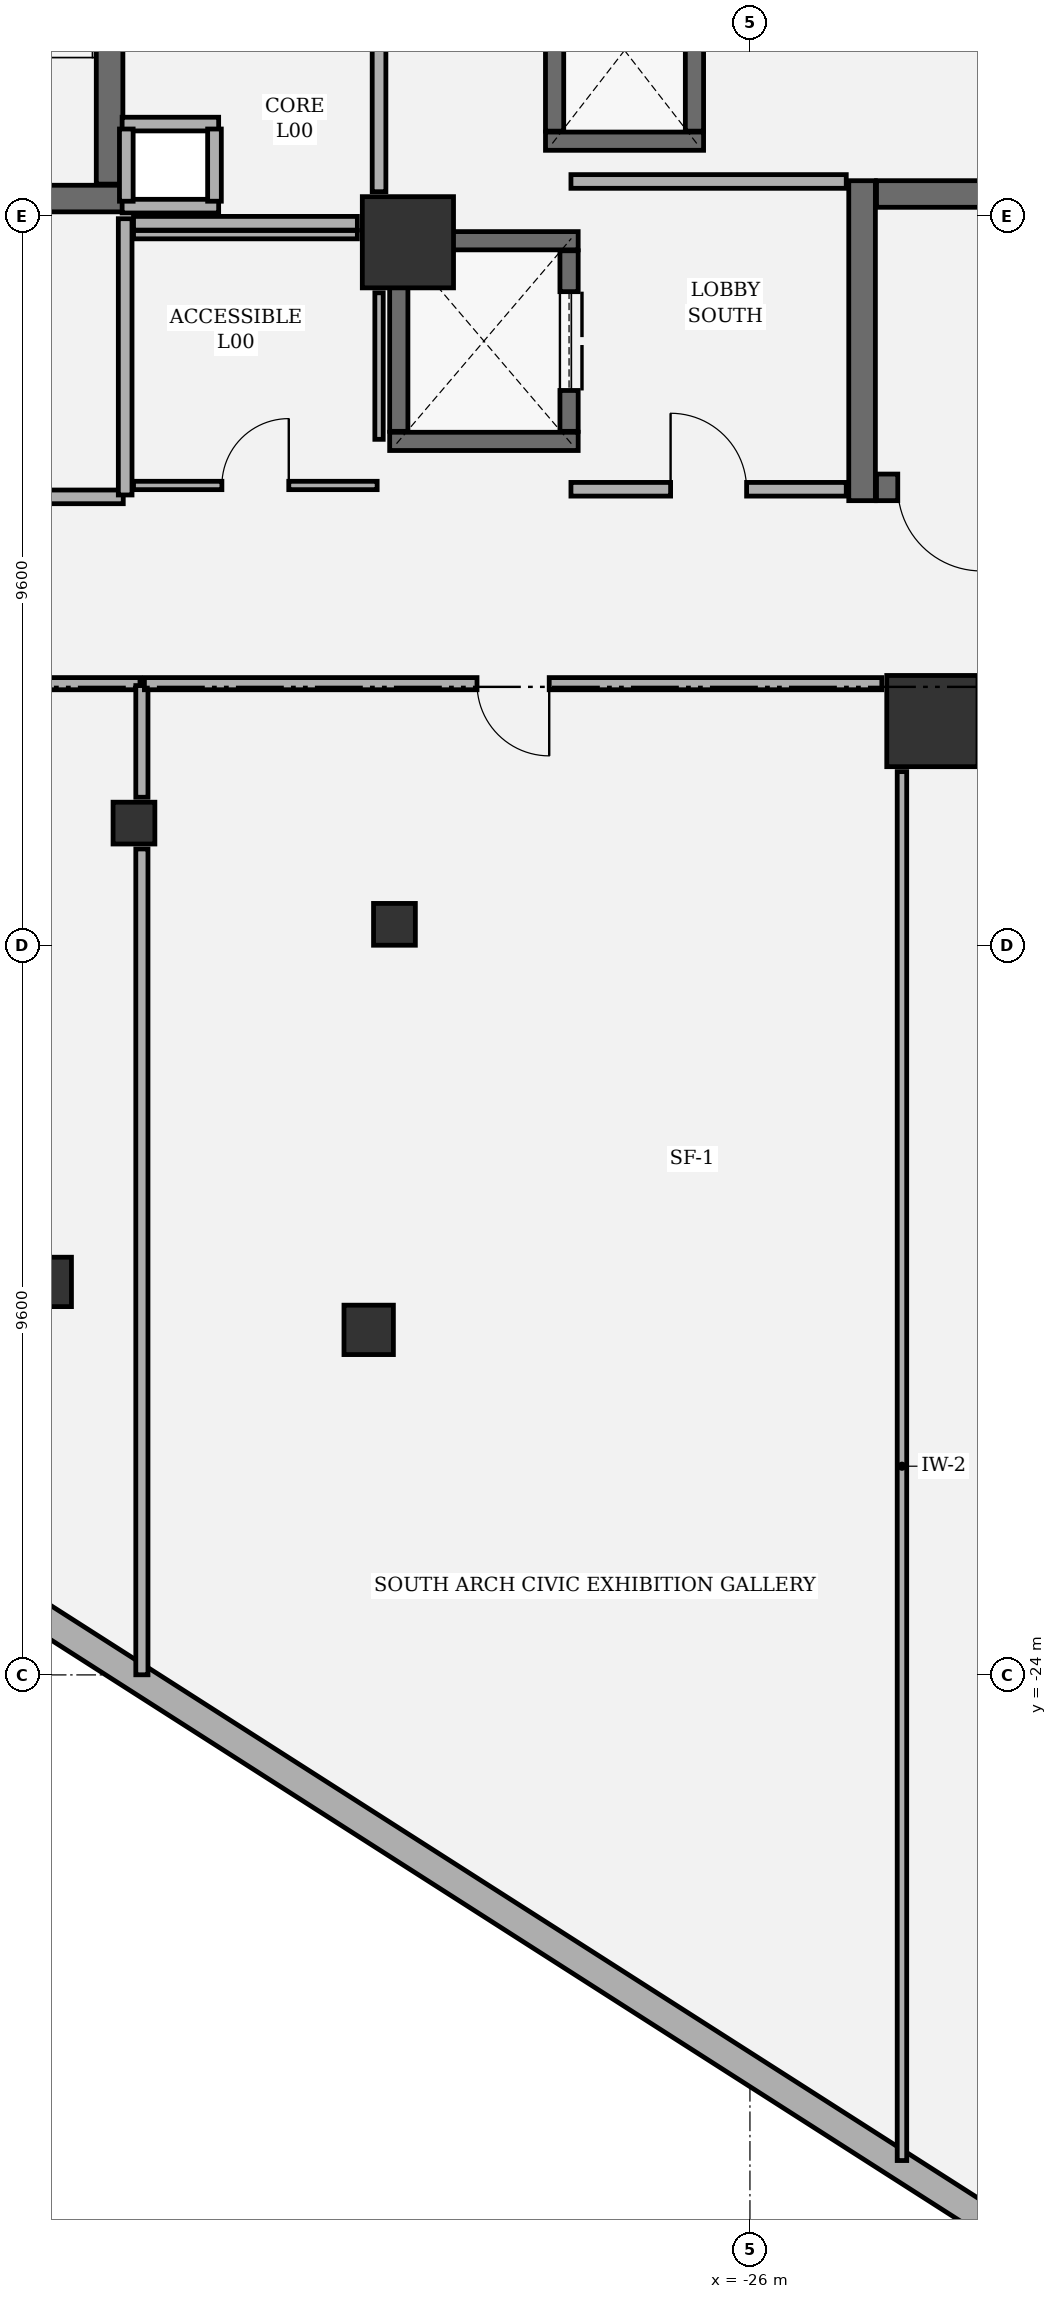
"""IFC4 building model, lengths in metres.
Left out: names, types, materials, properties, quantities, classifications, styles, units other than length and angle.
Written with IfcOpenShell. Run it as: python <this file> out.ifc"""

import sys

from ifc_helpers import new_model, si_unit, direction, frame, frame_2d, origin, origin_2d, place, context, subcontext, project, spatial, rectangle, extrude, element, fill, save


model = new_model("IFC4")
c1 = context("Model", 3, precision=1e-05, world=origin(), true_north=direction((0.0, 1.0)))
c2 = subcontext(c1, "Body", "Model", "MODEL_VIEW")
j1 = project(units=[si_unit("LENGTHUNIT", "METRE"), si_unit("PLANEANGLEUNIT", "RADIAN")], contexts=[c1])
p1 = place(None, origin())
s1 = spatial("IfcSite", under=j1, at=p1, CompositionType="ELEMENT")
p2 = place(p1, origin())
s2 = spatial("IfcBuilding", under=s1, at=p2, CompositionType="ELEMENT")
p3 = place(p2, origin())
s3 = spatial("IfcBuildingStorey", under=s2, at=p3, CompositionType="ELEMENT", Elevation=0.0)
for number, where, z_axis, x_axis in (
    (1, (-23.6, -11.45, 0.0), (0.0, 0.0, 1.0), (1.0, 0.0, 0.0)),
    (2, (-30.5, -5.15, 0.0), (0.0, 0.0, 1.0), (1.0, 0.0, 0.0)),
):
    element("IfcColumn", number, at=place(p3, frame(where, z_axis=z_axis, x_axis=x_axis)), inside=s3, PredefinedType="COLUMN", context=c2, shape_type="SweptSolid", body=[
        extrude(rectangle(XDim=1.2, YDim=1.2, at=origin_2d()), origin(), (0.0, 0.0, 1.0), 6.6),
    ])
for number, where, z_axis, x_axis in (
    (3, (-35.252, -18.829, 0.0), (0.0, 0.0, 1.0), (1.0, 0.0, 0.0)),
    (4, (-31.016, -19.46, 0.0), (0.0, 0.0, 1.0), (1.0, 0.0, 0.0)),
):
    element("IfcColumn", number, at=place(p3, frame(where, z_axis=z_axis, x_axis=x_axis)), inside=s3, PredefinedType="COLUMN", context=c2, shape_type="SweptSolid", body=[
        extrude(rectangle(XDim=0.65, YDim=0.65, at=origin_2d()), origin(), (0.0, 0.0, 1.0), 6.6),
    ])
for number, where, z_axis, x_axis in (
    (5, (-34.104, -12.792, 0.0), (0.0, 0.0, 1.0), (1.0, 0.0, 0.0)),
    (6, (-30.677, -14.124, 0.0), (0.0, 0.0, 1.0), (1.0, 0.0, 0.0)),
):
    element("IfcColumn", number, at=place(p3, frame(where, z_axis=z_axis, x_axis=x_axis)), inside=s3, PredefinedType="COLUMN", context=c2, shape_type="SweptSolid", body=[
        extrude(rectangle(XDim=0.55, YDim=0.55, at=origin_2d()), origin(), (0.0, 0.0, 1.0), 6.6),
    ])
p4 = place(p3, frame((-13.635, -37.094, 0.0), z_axis=(0.0, 0.0, 1.0), x_axis=(-0.842602364841, 0.538536214905, 0.0)))
e7 = element("IfcWall", 7, at=p4, inside=s3, PredefinedType="SOLIDWALL", context=c2, shape_type="SweptSolid", body=[
    extrude(rectangle(XDim=60.27, YDim=0.38, at=frame_2d((30.135, 0.0))), origin(), (0.0, 0.0, 1.0), 6.34),
])
p5 = place(p3, frame((-24.525, -4.34, 0.0), z_axis=(0.0, 0.0, 1.0), x_axis=(0.0, -1.0, 0.0)))
e8 = element("IfcWall", 8, at=p5, inside=s3, PredefinedType="SHEAR", context=c2, shape_type="SweptSolid", body=[
    extrude(rectangle(XDim=4.21, YDim=0.35, at=frame_2d((2.105, 0.0))), origin(), (0.0, 0.0, 1.0), 6.34),
])
p6 = place(p3, frame((-16.215, -8.375, 0.0), z_axis=(0.0, 0.0, 1.0), x_axis=(-1.0, 0.0, 0.0)))
e9 = element("IfcWall", 9, at=p6, inside=s3, PredefinedType="SHEAR", context=c2, shape_type="SweptSolid", body=[
    extrude(rectangle(XDim=8.12, YDim=0.35, at=frame_2d((4.06, 0.0))), origin(), (0.0, 0.0, 1.0), 6.34),
])
p7 = place(p6, frame((6.74, 0.0, 0.0)))
e10 = element("IfcOpeningElement", 10, at=p7, cuts=e9, PredefinedType="OPENING", context=c2, shape_type="SweptSolid", body=[
    extrude(rectangle(XDim=1.1, YDim=2.2, at=frame_2d((0.55, 1.1))), frame((0.0, 0.185, 0.0), z_axis=(0.0, -1.0, 0.0), x_axis=(1.0, 0.0, 0.0)), (0.0, 0.0, 1.0), 0.37),
])
p8 = place(p3, frame((-16.215, -4.515, 0.0), z_axis=(0.0, 0.0, 1.0), x_axis=(-1.0, 0.0, 0.0)))
e11 = element("IfcWall", 11, at=p8, inside=s3, PredefinedType="SHEAR", context=c2, shape_type="SweptSolid", body=[
    extrude(rectangle(XDim=8.12, YDim=0.35, at=frame_2d((4.06, 0.0))), origin(), (0.0, 0.0, 1.0), 6.34),
])
p9 = place(p3, frame((-34.25, -4.575, 0.0), z_axis=(0.0, 0.0, 1.0), x_axis=(-1.0, 0.0, 0.0)))
e12 = element("IfcWall", 12, at=p9, inside=s3, PredefinedType="SHEAR", context=c2, shape_type="SweptSolid", body=[
    extrude(rectangle(XDim=4.21, YDim=0.35, at=frame_2d((2.105, 0.0))), origin(), (0.0, 0.0, 1.0), 6.34),
])
p10 = place(p9, frame((2.39, 0.0, 0.0)))
e13 = element("IfcOpeningElement", 13, at=p10, cuts=e12, PredefinedType="OPENING", context=c2, shape_type="SweptSolid", body=[
    extrude(rectangle(XDim=1.1, YDim=2.2, at=frame_2d((0.55, 1.1))), frame((0.0, 0.185, 0.0), z_axis=(0.0, -1.0, 0.0), x_axis=(1.0, 0.0, 0.0)), (0.0, 0.0, 1.0), 0.37),
])
p11 = place(p3, frame((-34.425, -4.385, 0.0), z_axis=(0.0, 0.0, 1.0), x_axis=(0.0, 1.0, 0.0)))
e14 = element("IfcWall", 14, at=p11, inside=s3, PredefinedType="SHEAR", context=c2, shape_type="SweptSolid", body=[
    extrude(rectangle(XDim=8.77, YDim=0.35, at=frame_2d((4.385, 0.0))), origin(), (0.0, 0.0, 1.0), 6.34),
])
for number, where, z_axis, x_axis in (
    (15, (-28.26, -7.77, 0.0), (0.0, 0.0, 1.0), (-1.0, 0.0, 0.0)),
    (16, (-30.74, -5.13, 0.0), (0.0, 0.0, 1.0), (1.0, 0.0, 0.0)),
):
    element("IfcWall", number, at=place(p3, frame(where, z_axis=z_axis, x_axis=x_axis)), inside=s3, PredefinedType="SHEAR", context=c2, shape_type="SweptSolid", body=[
        extrude(rectangle(XDim=2.48, YDim=0.24, at=frame_2d((1.24, 0.0))), origin(), (0.0, 0.0, 1.0), 6.34),
    ])
p12 = place(p3, frame((-30.62, -7.638, 0.0), z_axis=(0.0, 0.0, 1.0), x_axis=(0.0, 1.0, 0.0)))
e17 = element("IfcWall", 17, at=p12, inside=s3, PredefinedType="SHEAR", context=c2, shape_type="SweptSolid", body=[
    extrude(rectangle(XDim=2.376, YDim=0.24, at=frame_2d((1.188, 0.0))), origin(), (0.0, 0.0, 1.0), 6.34),
])
p13 = place(p3, frame((-28.38, -5.262, 0.0), z_axis=(0.0, 0.0, 1.0), x_axis=(0.0, -1.0, 0.0)))
e18 = element("IfcWall", 18, at=p13, inside=s3, PredefinedType="SHEAR", context=c2, shape_type="SweptSolid", body=[
    extrude(rectangle(XDim=2.376, YDim=0.24, at=frame_2d((1.188, 0.0))), origin(), (0.0, 0.0, 1.0), 6.34),
])
p14 = place(p13, frame((0.538, 0.0, 0.0)))
e19 = element("IfcOpeningElement", 19, at=p14, cuts=e18, PredefinedType="OPENING", context=c2, shape_type="SweptSolid", body=[
    extrude(rectangle(XDim=1.3, YDim=2.3, at=frame_2d((0.65, 1.15))), frame((0.0, 0.13, 0.0), z_axis=(0.0, -1.0, 0.0), x_axis=(1.0, 0.0, 0.0)), (0.0, 0.0, 1.0), 0.26),
])
p15 = place(p3, frame((-26.61, -3.82, 0.0), z_axis=(0.0, 0.0, 1.0), x_axis=(-1.0, 0.0, 0.0)))
e20 = element("IfcWall", 20, at=p15, inside=s3, PredefinedType="SHEAR", context=c2, shape_type="SweptSolid", body=[
    extrude(rectangle(XDim=2.08, YDim=0.24, at=frame_2d((1.04, 0.0))), origin(), (0.0, 0.0, 1.0), 6.34),
])
for number, where, z_axis, x_axis in (
    (21, (-28.57, -3.688, 0.0), (0.0, 0.0, 1.0), (0.0, 1.0, 0.0)),
    (22, (-26.73, -1.562, 0.0), (0.0, 0.0, 1.0), (0.0, -1.0, 0.0)),
):
    element("IfcWall", number, at=place(p3, frame(where, z_axis=z_axis, x_axis=x_axis)), inside=s3, PredefinedType="SHEAR", context=c2, shape_type="SweptSolid", body=[
        extrude(rectangle(XDim=2.126, YDim=0.24, at=frame_2d((1.063, 0.0))), origin(), (0.0, 0.0, 1.0), 6.34),
    ])
for number, where, z_axis, x_axis in (
    (23, (-32.99, -4.675, 0.0), (0.0, 0.0, 1.0), (-1.0, 0.0, 0.0)),
    (24, (-34.26, -3.595, 0.0), (0.0, 0.0, 1.0), (1.0, 0.0, 0.0)),
):
    element("IfcWall", number, at=place(p3, frame(where, z_axis=z_axis, x_axis=x_axis)), inside=s3, PredefinedType="PARTITIONING", context=c2, shape_type="SweptSolid", body=[
        extrude(rectangle(XDim=1.27, YDim=0.18, at=frame_2d((0.635, 0.0))), origin(), (0.0, 0.0, 1.0), 6.34),
    ])
for number, where, z_axis, x_axis in (
    (25, (-34.205, -4.61, 0.0), (0.0, 0.0, 1.0), (0.0, 1.0, 0.0)),
    (26, (-33.045, -3.66, 0.0), (0.0, 0.0, 1.0), (0.0, -1.0, 0.0)),
):
    element("IfcWall", number, at=place(p3, frame(where, z_axis=z_axis, x_axis=x_axis)), inside=s3, PredefinedType="PARTITIONING", context=c2, shape_type="SweptSolid", body=[
        extrude(rectangle(XDim=0.95, YDim=0.18, at=frame_2d((0.475, 0.0))), origin(), (0.0, 0.0, 1.0), 6.34),
    ])
p16 = place(p3, frame((-40.625, -8.5, 0.0), z_axis=(0.0, 0.0, 1.0), x_axis=(1.0, 0.0, 0.0)))
e27 = element("IfcWall", 27, at=p16, inside=s3, PredefinedType="PARTITIONING", context=c2, shape_type="SweptSolid", body=[
    extrude(rectangle(XDim=6.38, YDim=0.18, at=frame_2d((3.19, 0.0))), origin(), (0.0, 0.0, 1.0), 5.853),
])
p17 = place(p3, frame((-34.22, -8.475, 0.0), z_axis=(0.0, 0.0, 1.0), x_axis=(0.0, 1.0, 0.0)))
e28 = element("IfcWall", 28, at=p17, inside=s3, PredefinedType="PARTITIONING", context=c2, shape_type="SweptSolid", body=[
    extrude(rectangle(XDim=3.635, YDim=0.18, at=frame_2d((1.817, 0.0))), origin(), (0.0, 0.0, 1.0), 6.34),
])
p18 = place(p3, frame((-28.355, -8.4, 0.0), z_axis=(0.0, 0.0, 1.0), x_axis=(1.0, 0.0, 0.0)))
e29 = element("IfcWall", 29, at=p18, inside=s3, PredefinedType="PARTITIONING", context=c2, shape_type="SweptSolid", body=[
    extrude(rectangle(XDim=3.622, YDim=0.18, at=frame_2d((1.811, 0.0))), origin(), (0.0, 0.0, 1.0), 6.34),
])
p19 = place(p18, frame((1.311, 0.0, 0.0)))
e30 = element("IfcOpeningElement", 30, at=p19, cuts=e29, PredefinedType="OPENING", context=c2, shape_type="SweptSolid", body=[
    extrude(rectangle(XDim=1.0, YDim=2.15, at=frame_2d((0.5, 1.075))), frame((0.0, 0.1, 0.0), z_axis=(0.0, -1.0, 0.0), x_axis=(1.0, 0.0, 0.0)), (0.0, 0.0, 1.0), 0.2),
])
p20 = place(p3, frame((-24.733, -4.35, 0.0), z_axis=(0.0, 0.0, 1.0), x_axis=(-1.0, 0.0, 0.0)))
e31 = element("IfcWall", 31, at=p20, inside=s3, PredefinedType="PARTITIONING", context=c2, shape_type="SweptSolid", body=[
    extrude(rectangle(XDim=3.622, YDim=0.18, at=frame_2d((1.811, 0.0))), origin(), (0.0, 0.0, 1.0), 6.34),
])
p21 = place(p3, frame((-34.11, -8.35, 0.0), z_axis=(0.0, 0.0, 1.0), x_axis=(1.0, 0.0, 0.0)))
e32 = element("IfcWall", 32, at=p21, inside=s3, PredefinedType="PARTITIONING", context=c2, shape_type="SweptSolid", body=[
    extrude(rectangle(XDim=3.205, YDim=0.11, at=frame_2d((1.603, 0.0))), origin(), (0.0, 0.0, 1.0), 6.34),
])
p22 = place(p21, frame((1.163, 0.0, 0.0)))
e33 = element("IfcOpeningElement", 33, at=p22, cuts=e32, PredefinedType="OPENING", context=c2, shape_type="SweptSolid", body=[
    extrude(rectangle(XDim=0.88, YDim=2.1, at=frame_2d((0.44, 1.05))), frame((0.0, 0.065, 0.0), z_axis=(0.0, -1.0, 0.0), x_axis=(1.0, 0.0, 0.0)), (0.0, 0.0, 1.0), 0.13),
])
p23 = place(p3, frame((-30.88, -7.743, 0.0), z_axis=(0.0, 0.0, 1.0), x_axis=(0.0, 1.0, 0.0)))
e34 = element("IfcWall", 34, at=p23, inside=s3, PredefinedType="PARTITIONING", context=c2, shape_type="SweptSolid", body=[
    extrude(rectangle(XDim=1.928, YDim=0.11, at=frame_2d((0.964, 0.0))), origin(), (0.0, 0.0, 1.0), 6.34),
])
p24 = place(p3, frame((-31.165, -5.05, 0.0), z_axis=(0.0, 0.0, 1.0), x_axis=(-1.0, 0.0, 0.0)))
e35 = element("IfcWall", 35, at=p24, inside=s3, PredefinedType="PARTITIONING", context=c2, shape_type="SweptSolid", body=[
    extrude(rectangle(XDim=2.945, YDim=0.11, at=frame_2d((1.473, 0.0))), origin(), (0.0, 0.0, 1.0), 6.34),
])
p25 = place(p3, frame((-34.025, -10.958, 0.0), z_axis=(0.0, 0.0, 1.0), x_axis=(-1.0, 0.0, 0.0)))
e36 = element("IfcWall", 36, at=p25, inside=s3, PredefinedType="PARTITIONING", context=c2, shape_type="SweptSolid", body=[
    extrude(rectangle(XDim=6.608, YDim=0.16, at=frame_2d((3.304, 0.0))), origin(), (0.0, 0.0, 1.0), 5.853),
])
p26 = place(p25, frame((2.704, 0.0, 0.0)))
e37 = element("IfcOpeningElement", 37, at=p26, cuts=e36, PredefinedType="OPENING", context=c2, shape_type="SweptSolid", body=[
    extrude(rectangle(XDim=1.2, YDim=2.15, at=frame_2d((0.6, 1.075))), frame((0.0, 0.09, 0.0), z_axis=(0.0, -1.0, 0.0), x_axis=(1.0, 0.0, 0.0)), (0.0, 0.0, 1.0), 0.18),
])
p27 = place(p3, frame((-34.0, -23.999, 0.0), z_axis=(0.0, 0.0, 1.0), x_axis=(0.0, 1.0, 0.0)))
e38 = element("IfcWall", 38, at=p27, inside=s3, PredefinedType="PARTITIONING", context=c2, shape_type="SweptSolid", body=[
    extrude(rectangle(XDim=10.866, YDim=0.16, at=frame_2d((5.433, 0.0))), origin(), (0.0, 0.0, 1.0), 6.34),
])
p28 = place(p3, frame((-34.0, -12.452, 0.0), z_axis=(0.0, 0.0, 1.0), x_axis=(0.0, 1.0, 0.0)))
e39 = element("IfcWall", 39, at=p28, inside=s3, PredefinedType="PARTITIONING", context=c2, shape_type="SweptSolid", body=[
    extrude(rectangle(XDim=1.469, YDim=0.16, at=frame_2d((0.735, 0.0))), origin(), (0.0, 0.0, 1.0), 6.34),
])
p29 = place(p3, frame((-34.11, -4.9, 0.0), z_axis=(0.0, 0.0, 1.0), x_axis=(1.0, 0.0, 0.0)))
e40 = element("IfcWall", 40, at=p29, inside=s3, PredefinedType="PARTITIONING", context=c2, shape_type="SweptSolid", body=[
    extrude(rectangle(XDim=2.945, YDim=0.18, at=frame_2d((1.473, 0.0))), origin(), (0.0, 0.0, 1.0), 6.34),
])
p30 = place(p3, frame((-30.88, -4.485, 0.0), z_axis=(0.0, 0.0, 1.0), x_axis=(0.0, 1.0, 0.0)))
e41 = element("IfcWall", 41, at=p30, inside=s3, PredefinedType="PARTITIONING", context=c2, shape_type="SweptSolid", body=[
    extrude(rectangle(XDim=2.86, YDim=0.18, at=frame_2d((1.43, 0.0))), origin(), (0.0, 0.0, 1.0), 6.34),
])
p31 = place(p3, frame((-24.0, -12.115, 0.0), z_axis=(0.0, 0.0, 1.0), x_axis=(0.0, -1.0, 0.0)))
e42 = element("IfcWall", 42, at=p31, inside=s3, PredefinedType="PARTITIONING", context=c2, shape_type="SweptSolid", body=[
    extrude(rectangle(XDim=18.275, YDim=0.125, at=frame_2d((9.137, 0.0))), origin(), (0.0, 0.0, 1.0), 5.853),
])
p32 = place(p3, frame((-24.265, -10.958, 0.0), z_axis=(0.0, 0.0, 1.0), x_axis=(-1.0, 0.0, 0.0)))
e43 = element("IfcWall", 43, at=p32, inside=s3, PredefinedType="PARTITIONING", context=c2, shape_type="SweptSolid", body=[
    extrude(rectangle(XDim=9.702, YDim=0.16, at=frame_2d((4.851, 0.0))), origin(), (0.0, 0.0, 1.0), 5.853),
])
p33 = place(p32, frame((4.376, 0.0, 0.0)))
e44 = element("IfcOpeningElement", 44, at=p33, cuts=e43, PredefinedType="OPENING", context=c2, shape_type="SweptSolid", body=[
    extrude(rectangle(XDim=0.95, YDim=2.15, at=frame_2d((0.475, 1.075))), frame((0.0, 0.09, 0.0), z_axis=(0.0, -1.0, 0.0), x_axis=(1.0, 0.0, 0.0)), (0.0, 0.0, 1.0), 0.18),
])
p34 = place(p7, origin())
e45 = element("IfcDoor", 45, at=p34, inside=s3, OperationType="SINGLE_SWING_LEFT", PredefinedType="DOOR", context=c2, shape_type="SweptSolid", body=[
    extrude(rectangle(XDim=1.1, YDim=2.2, at=frame_2d((0.55, 1.1))), frame((0.0, 0.025, 0.0), z_axis=(0.0, -1.0, 0.0), x_axis=(1.0, 0.0, 0.0)), (0.0, 0.0, 1.0), 0.05),
])
fill(e10, e45)
p35 = place(p14, origin())
e46 = element("IfcDoor", 46, at=p35, inside=s3, OperationType="DOUBLE_DOOR_SLIDING", PredefinedType="DOOR", context=c2, shape_type="SweptSolid", body=[
    extrude(rectangle(XDim=1.3, YDim=2.3, at=frame_2d((0.65, 1.15))), frame((0.0, 0.025, 0.0), z_axis=(0.0, -1.0, 0.0), x_axis=(1.0, 0.0, 0.0)), (0.0, 0.0, 1.0), 0.05),
])
fill(e19, e46)
p36 = place(p33, origin())
e47 = element("IfcDoor", 47, at=p36, inside=s3, OperationType="SINGLE_SWING_LEFT", PredefinedType="DOOR", context=c2, shape_type="SweptSolid", body=[
    extrude(rectangle(XDim=0.95, YDim=2.15, at=frame_2d((0.475, 1.075))), frame((0.0, 0.025, 0.0), z_axis=(0.0, -1.0, 0.0), x_axis=(1.0, 0.0, 0.0)), (0.0, 0.0, 1.0), 0.05),
])
fill(e44, e47)
p37 = place(p19, origin())
e48 = element("IfcDoor", 48, at=p37, inside=s3, OperationType="SINGLE_SWING_LEFT", PredefinedType="DOOR", context=c2, shape_type="SweptSolid", body=[
    extrude(rectangle(XDim=1.0, YDim=2.15, at=frame_2d((0.5, 1.075))), frame((0.0, 0.025, 0.0), z_axis=(0.0, -1.0, 0.0), x_axis=(1.0, 0.0, 0.0)), (0.0, 0.0, 1.0), 0.05),
])
fill(e30, e48)
p38 = place(p22, origin())
e49 = element("IfcDoor", 49, at=p38, inside=s3, OperationType="SINGLE_SWING_RIGHT", PredefinedType="DOOR", context=c2, shape_type="SweptSolid", body=[
    extrude(rectangle(XDim=0.88, YDim=2.1, at=frame_2d((0.44, 1.05))), frame((0.0, 0.025, 0.0), z_axis=(0.0, -1.0, 0.0), x_axis=(1.0, 0.0, 0.0)), (0.0, 0.0, 1.0), 0.05),
])
fill(e33, e49)
save(model, sys.argv[1])
